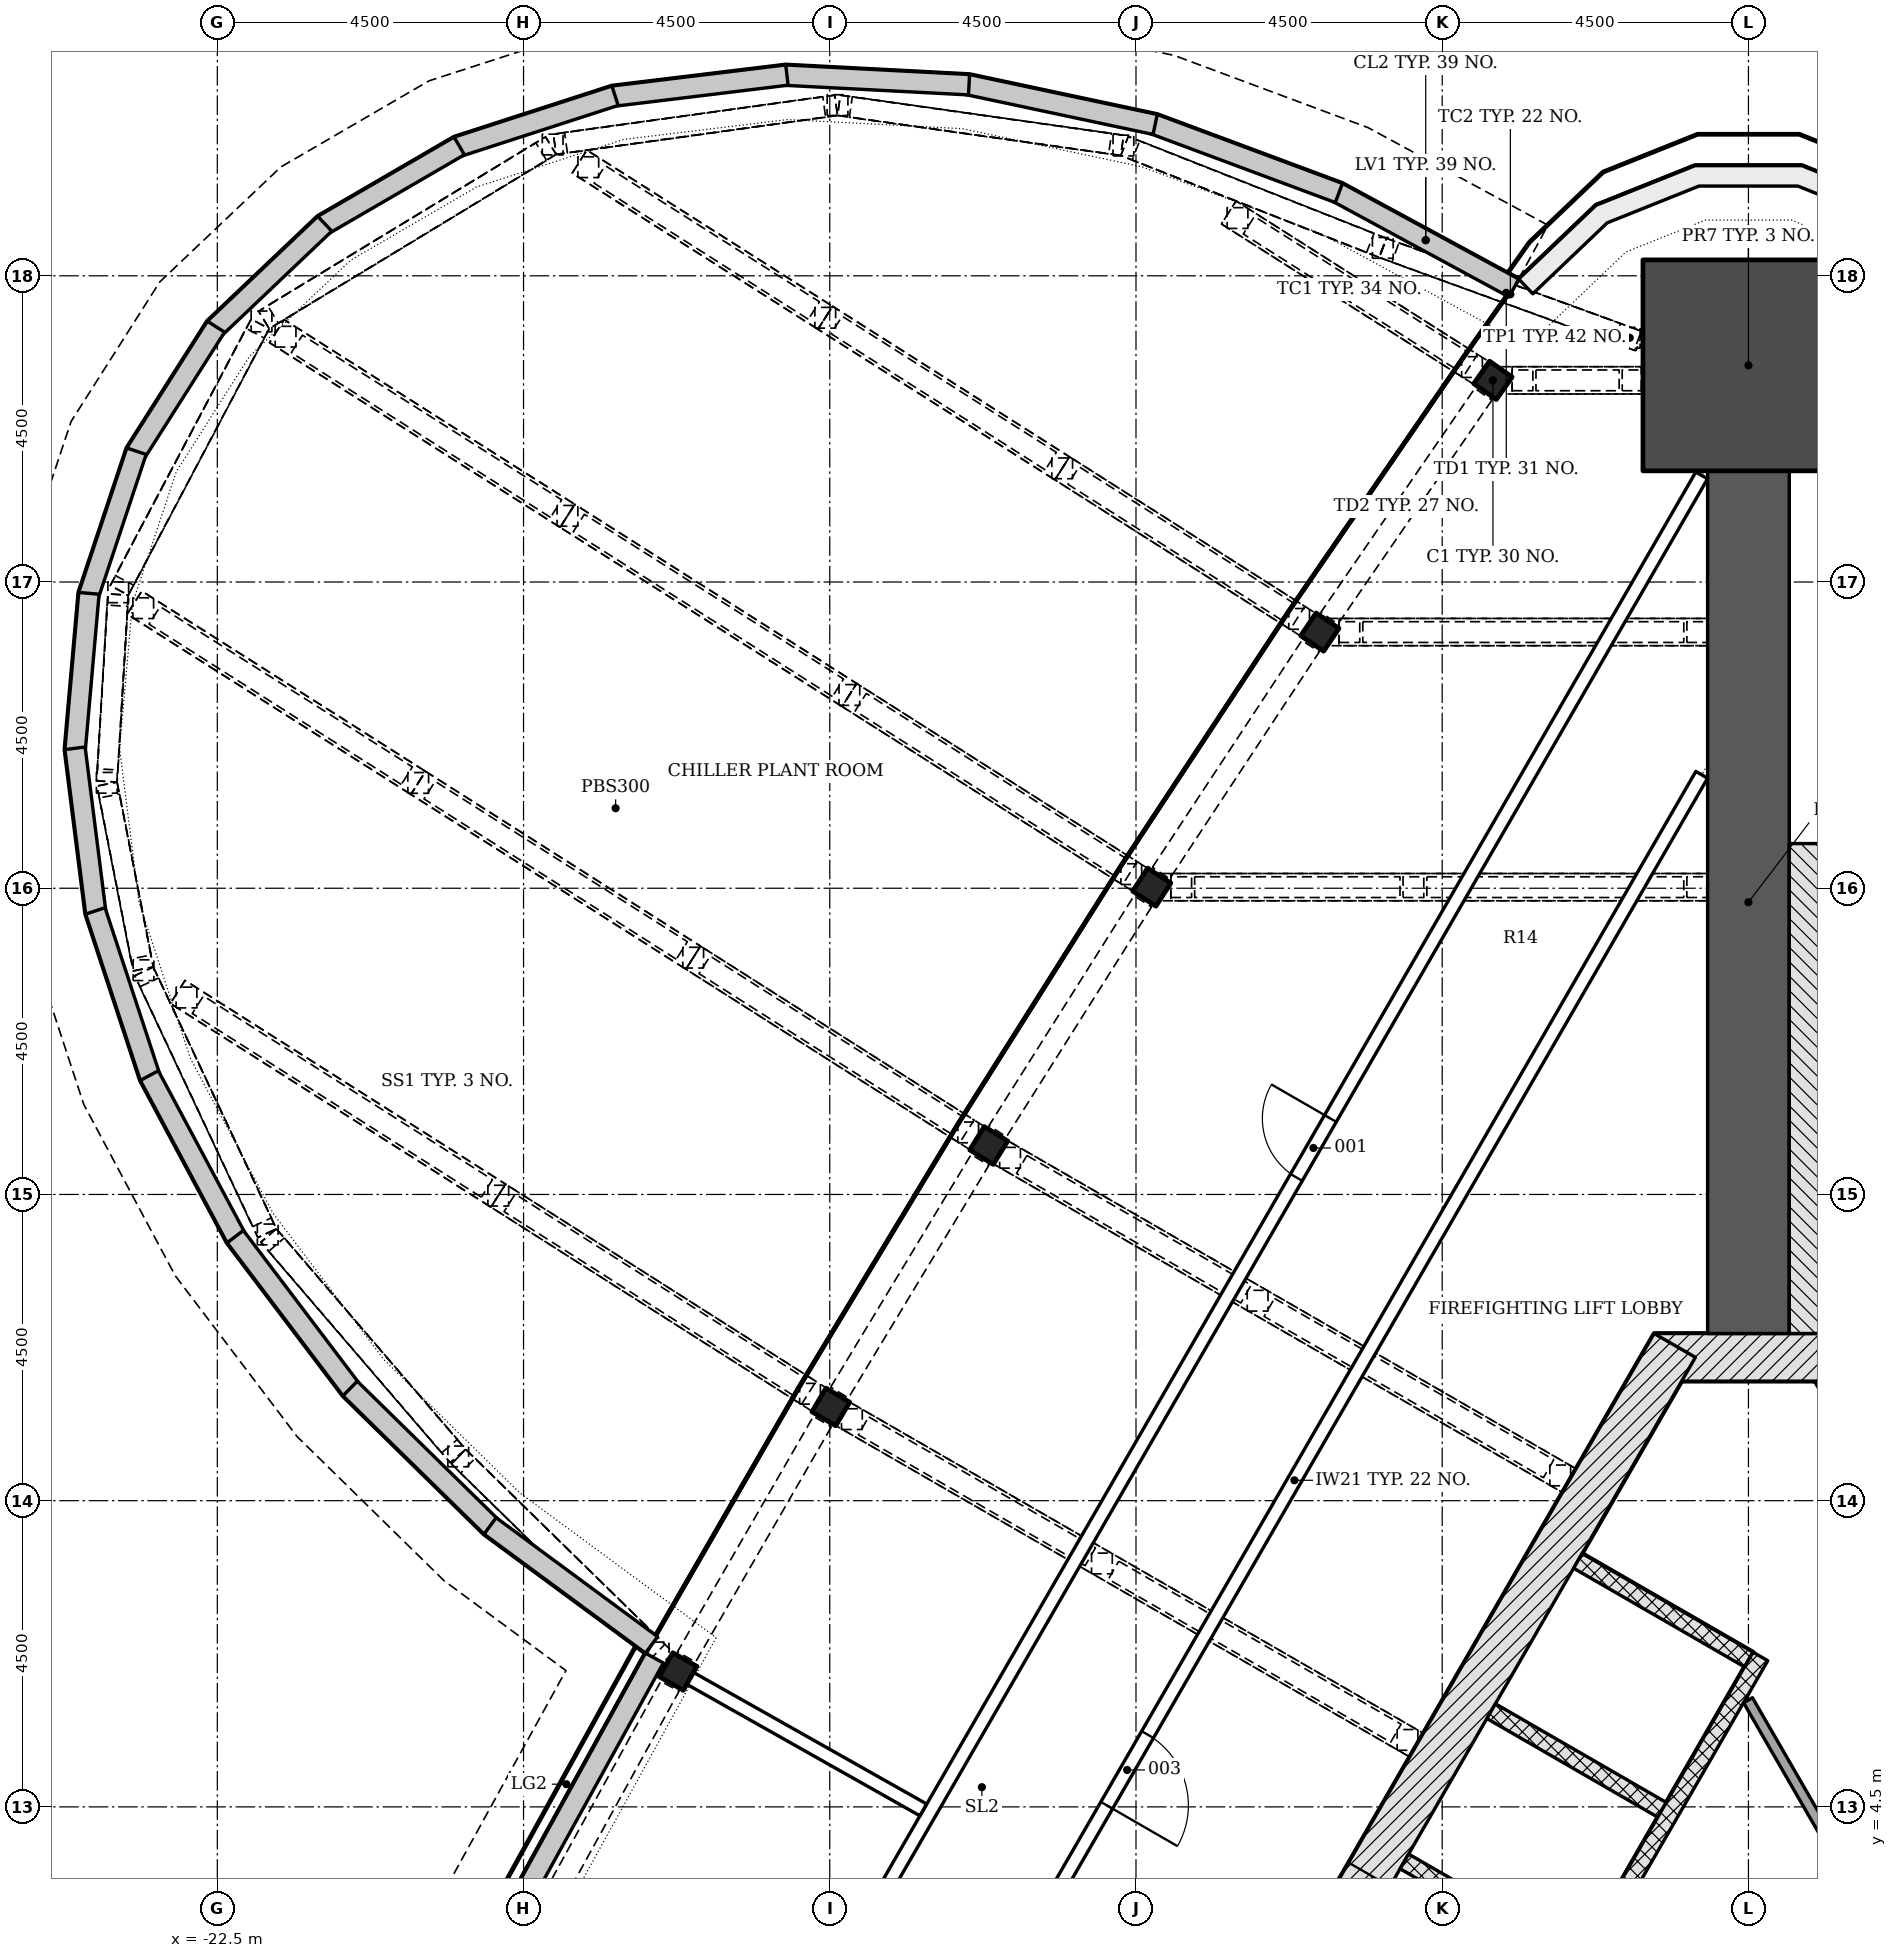
"""IFC4 building model, lengths in metres.
Left out: names, types, materials, properties, quantities, classifications, styles, units other than length and angle.
Written with IfcOpenShell. Run it as: python <this file> out.ifc"""

import sys

from ifc_helpers import new_model, si_unit, direction, frame, frame_2d, origin, origin_2d, place, context, subcontext, project, spatial, polyline, rectangle, i_section, outline, extrude, element, fill, save


model = new_model("IFC4")
c1 = context("Model", 3, precision=1e-05, world=origin(), true_north=direction((0.0, 1.0)))
c2 = subcontext(c1, "Body", "Model", "MODEL_VIEW")
j1 = project(units=[si_unit("LENGTHUNIT", "METRE"), si_unit("PLANEANGLEUNIT", "RADIAN")], contexts=[c1])
p1 = place(None, origin())
s1 = spatial("IfcSite", under=j1, at=p1, CompositionType="ELEMENT")
p2 = place(p1, origin())
s2 = spatial("IfcBuilding", under=s1, at=p2, CompositionType="ELEMENT")
p3 = place(p2, frame((0.0, 0.0, 87.0)))
s3 = spatial("IfcBuildingStorey", under=s2, at=p3, CompositionType="ELEMENT", Elevation=87.0)
p4 = place(p3, frame((10.311, -4.703, -0.3), z_axis=(0.0, 0.0, 1.0), x_axis=(-0.500001446645, 0.866024568562, 0.0)))
e1 = element("IfcWall", 1, at=p4, inside=s3, PredefinedType="SHEAR", context=c2, shape_type="SweptSolid", body=[
    extrude(rectangle(XDim=18.458, YDim=0.7, at=frame_2d((9.229, 0.0))), origin(), (0.0, 0.0, 1.0), 4.6),
])
p5 = place(p4, frame((8.7, 0.0, 0.3)))
e2 = element("IfcOpeningElement", 2, at=p5, cuts=e1, PredefinedType="OPENING", context=c2, shape_type="SweptSolid", body=[
    extrude(rectangle(XDim=1.0, YDim=2.1, at=frame_2d((0.5, 1.05))), frame((0.0, 0.36, 0.0), z_axis=(0.0, -1.0, 0.0), x_axis=(1.0, 0.0, 0.0)), (0.0, 0.0, 1.0), 0.72),
])
p6 = place(p4, frame((4.002, 0.0, 0.3)))
e3 = element("IfcOpeningElement", 3, at=p6, cuts=e1, PredefinedType="OPENING", context=c2, shape_type="SweptSolid", body=[
    extrude(rectangle(XDim=0.9, YDim=2.1, at=frame_2d((0.45, 1.05))), frame((0.0, 0.36, 0.0), z_axis=(0.0, -1.0, 0.0), x_axis=(1.0, 0.0, 0.0)), (0.0, 0.0, 1.0), 0.72),
])
p7 = place(p4, frame((14.093, 0.0, 0.3)))
e4 = element("IfcOpeningElement", 4, at=p7, cuts=e1, PredefinedType="OPENING", context=c2, shape_type="SweptSolid", body=[
    extrude(rectangle(XDim=0.9, YDim=2.1, at=frame_2d((0.45, 1.05))), frame((0.0, 0.36, 0.0), z_axis=(0.0, -1.0, 0.0), x_axis=(1.0, 0.0, 0.0)), (0.0, 0.0, 1.0), 0.72),
])
p8 = place(p3, frame((1.386, 11.106, -0.3), z_axis=(0.0, 0.0, 1.0), x_axis=(-1.0, 0.0, 0.0)))
e5 = element("IfcWall", 5, at=p8, inside=s3, PredefinedType="SHEAR", context=c2, shape_type="SweptSolid", body=[
    extrude(rectangle(XDim=2.771, YDim=0.7, at=frame_2d((1.386, 0.0))), origin(), (0.0, 0.0, 1.0), 4.6),
])
p9 = place(p3, frame((-1.083, 11.281, -0.3), z_axis=(0.0, 0.0, 1.0), x_axis=(-0.500001446645, -0.866024568562, 0.0)))
e6 = element("IfcWall", 6, at=p9, inside=s3, PredefinedType="SHEAR", context=c2, shape_type="SweptSolid", body=[
    extrude(rectangle(XDim=18.458, YDim=0.7, at=frame_2d((9.229, 0.0))), origin(), (0.0, 0.0, 1.0), 4.6),
])
p10 = place(p9, frame((8.979, 0.0, 0.3)))
e7 = element("IfcOpeningElement", 7, at=p10, cuts=e6, PredefinedType="OPENING", context=c2, shape_type="SweptSolid", body=[
    extrude(rectangle(XDim=1.2, YDim=2.1, at=frame_2d((0.6, 1.05))), frame((0.0, 0.36, 0.0), z_axis=(0.0, -1.0, 0.0), x_axis=(1.0, 0.0, 0.0)), (0.0, 0.0, 1.0), 0.72),
])
p11 = place(p9, frame((11.029, 0.0, 0.3)))
e8 = element("IfcOpeningElement", 8, at=p11, cuts=e6, PredefinedType="OPENING", context=c2, shape_type="SweptSolid", body=[
    extrude(rectangle(XDim=1.2, YDim=2.1, at=frame_2d((0.6, 1.05))), frame((0.0, 0.36, 0.0), z_axis=(0.0, -1.0, 0.0), x_axis=(1.0, 0.0, 0.0)), (0.0, 0.0, 1.0), 0.72),
])
p12 = place(p3, frame((0.0, 11.456, -0.3), z_axis=(0.0, 0.0, 1.0), x_axis=(0.0, 1.0, 0.0)))
e9 = element("IfcWall", 9, at=p12, inside=s3, PredefinedType="SHEAR", context=c2, shape_type="SweptSolid", body=[
    extrude(rectangle(XDim=12.678, YDim=1.2, at=frame_2d((6.339, 0.0))), origin(), (0.0, 0.0, 1.0), 4.6),
])
p13 = place(p3, frame((0.0, 25.684, -0.3), z_axis=(0.0, 0.0, 1.0), x_axis=(0.0, 1.0, 0.0)))
e10 = element("IfcColumn", 10, at=p13, inside=s3, PredefinedType="COLUMN", context=c2, shape_type="SweptSolid", body=[
    extrude(rectangle(XDim=3.1, YDim=3.1, at=origin_2d()), origin(), (0.0, 0.0, 1.0), 4.6),
])
for number, where, z_axis, x_axis in (
    (11, (-3.755, 25.464, -0.3), (0.0, 0.0, 1.0), (-0.575, -0.818, 0.0)),
    (12, (-6.298, 21.765, -0.3), (0.0, 0.0, 1.0), (-0.558, -0.83, 0.0)),
    (13, (-8.768, 18.016, -0.3), (0.0, 0.0, 1.0), (-0.542, -0.84, 0.0)),
    (14, (-11.164, 14.22, -0.3), (0.0, 0.0, 1.0), (-0.525, -0.851, 0.0)),
    (15, (-13.484, 10.377, -0.3), (0.0, 0.0, 1.0), (-0.508, -0.861, 0.0)),
    (16, (-15.729, 6.49, -0.3), (0.0, 0.0, 1.0), (-0.491, -0.871, 0.0)),
):
    element("IfcColumn", number, at=place(p3, frame(where, z_axis=z_axis, x_axis=x_axis)), inside=s3, PredefinedType="COLUMN", context=c2, shape_type="SweptSolid", body=[
        extrude(i_section(OverallWidth=0.404, OverallDepth=0.406, WebThickness=0.027, FlangeThickness=0.044, FilletRadius=0.015, at=origin_2d()), origin(), (0.0, 0.0, 1.0), 4.6),
    ])
p14 = place(p3, origin())
e17 = element("IfcWall", 17, at=p14, inside=s3, PredefinedType="NOTDEFINED", context=c2, shape_type="SweptSolid", body=[
    extrude(outline(polyline([(-3.375, 26.953), (-5.966, 28.358), (-6.109, 28.094), (-3.519, 26.689), (-3.375, 26.953)])), origin(), (0.0, 0.0, 1.0), 1.2),
])
p15 = place(p3, origin())
e18 = element("IfcWall", 18, at=p15, inside=s3, PredefinedType="NOTDEFINED", context=c2, shape_type="SweptSolid", body=[
    extrude(outline(polyline([(-5.966, 28.358), (-8.687, 29.371), (-8.792, 29.09), (-6.071, 28.076), (-5.966, 28.358)])), origin(), (0.0, 0.0, 1.0), 1.2),
])
p16 = place(p3, origin())
e19 = element("IfcWall", 19, at=p16, inside=s3, PredefinedType="NOTDEFINED", context=c2, shape_type="SweptSolid", body=[
    extrude(outline(polyline([(-8.687, 29.371), (-11.446, 29.958), (-11.508, 29.665), (-8.75, 29.077), (-8.687, 29.371)])), origin(), (0.0, 0.0, 1.0), 1.2),
])
p17 = place(p3, origin())
e20 = element("IfcWall", 20, at=p17, inside=s3, PredefinedType="NOTDEFINED", context=c2, shape_type="SweptSolid", body=[
    extrude(outline(polyline([(-11.446, 29.958), (-14.148, 30.099), (-14.163, 29.799), (-11.461, 29.658), (-11.446, 29.958)])), origin(), (0.0, 0.0, 1.0), 1.2),
])
p18 = place(p3, origin())
e21 = element("IfcWall", 21, at=p18, inside=s3, PredefinedType="NOTDEFINED", context=c2, shape_type="SweptSolid", body=[
    extrude(outline(polyline([(-14.148, 30.099), (-16.702, 29.789), (-16.666, 29.491), (-14.112, 29.801), (-14.148, 30.099)])), origin(), (0.0, 0.0, 1.0), 1.2),
])
p19 = place(p3, origin())
e22 = element("IfcWall", 22, at=p19, inside=s3, PredefinedType="NOTDEFINED", context=c2, shape_type="SweptSolid", body=[
    extrude(outline(polyline([(-16.702, 29.789), (-19.02, 29.039), (-18.928, 28.753), (-16.609, 29.503), (-16.702, 29.789)])), origin(), (0.0, 0.0, 1.0), 1.2),
])
p20 = place(p3, origin())
e23 = element("IfcWall", 23, at=p20, inside=s3, PredefinedType="NOTDEFINED", context=c2, shape_type="SweptSolid", body=[
    extrude(outline(polyline([(-19.02, 29.039), (-21.024, 27.873), (-20.874, 27.614), (-18.869, 28.779), (-19.02, 29.039)])), origin(), (0.0, 0.0, 1.0), 1.2),
])
p21 = place(p3, origin())
e24 = element("IfcWall", 24, at=p21, inside=s3, PredefinedType="NOTDEFINED", context=c2, shape_type="SweptSolid", body=[
    extrude(outline(polyline([(-21.024, 27.873), (-22.646, 26.333), (-22.439, 26.115), (-20.818, 27.656), (-21.024, 27.873)])), origin(), (0.0, 0.0, 1.0), 1.2),
])
p22 = place(p3, origin())
e25 = element("IfcWall", 25, at=p22, inside=s3, PredefinedType="NOTDEFINED", context=c2, shape_type="SweptSolid", body=[
    extrude(outline(polyline([(-22.646, 26.333), (-23.83, 24.469), (-23.577, 24.309), (-22.393, 26.172), (-22.646, 26.333)])), origin(), (0.0, 0.0, 1.0), 1.2),
])
p23 = place(p3, origin())
e26 = element("IfcWall", 26, at=p23, inside=s3, PredefinedType="NOTDEFINED", context=c2, shape_type="SweptSolid", body=[
    extrude(outline(polyline([(-23.83, 24.469), (-24.536, 22.347), (-24.251, 22.252), (-23.545, 24.375), (-23.83, 24.469)])), origin(), (0.0, 0.0, 1.0), 1.2),
])
p24 = place(p3, origin())
e27 = element("IfcWall", 27, at=p24, inside=s3, PredefinedType="NOTDEFINED", context=c2, shape_type="SweptSolid", body=[
    extrude(outline(polyline([(-24.536, 22.347), (-24.74, 20.038), (-24.441, 20.011), (-24.237, 22.321), (-24.536, 22.347)])), origin(), (0.0, 0.0, 1.0), 1.2),
])
p25 = place(p3, origin())
e28 = element("IfcWall", 28, at=p25, inside=s3, PredefinedType="NOTDEFINED", context=c2, shape_type="SweptSolid", body=[
    extrude(outline(polyline([(-24.74, 20.038), (-24.435, 17.62), (-24.137, 17.657), (-24.442, 20.075), (-24.74, 20.038)])), origin(), (0.0, 0.0, 1.0), 1.2),
])
p26 = place(p3, origin())
e29 = element("IfcWall", 29, at=p26, inside=s3, PredefinedType="NOTDEFINED", context=c2, shape_type="SweptSolid", body=[
    extrude(outline(polyline([(-24.435, 17.62), (-23.631, 15.176), (-23.346, 15.27), (-24.15, 17.714), (-24.435, 17.62)])), origin(), (0.0, 0.0, 1.0), 1.2),
])
p27 = place(p3, origin())
e30 = element("IfcWall", 30, at=p27, inside=s3, PredefinedType="NOTDEFINED", context=c2, shape_type="SweptSolid", body=[
    extrude(outline(polyline([(-23.631, 15.176), (-22.356, 12.79), (-22.091, 12.931), (-23.366, 15.318), (-23.631, 15.176)])), origin(), (0.0, 0.0, 1.0), 1.2),
])
p28 = place(p3, origin())
e31 = element("IfcWall", 31, at=p28, inside=s3, PredefinedType="NOTDEFINED", context=c2, shape_type="SweptSolid", body=[
    extrude(outline(polyline([(-22.356, 12.79), (-20.653, 10.542), (-20.414, 10.723), (-22.117, 12.971), (-22.356, 12.79)])), origin(), (0.0, 0.0, 1.0), 1.2),
])
p29 = place(p3, origin())
e32 = element("IfcWall", 32, at=p29, inside=s3, PredefinedType="NOTDEFINED", context=c2, shape_type="SweptSolid", body=[
    extrude(outline(polyline([(-20.653, 10.542), (-18.58, 8.509), (-18.37, 8.723), (-20.443, 10.756), (-20.653, 10.542)])), origin(), (0.0, 0.0, 1.0), 1.2),
])
p30 = place(p3, origin())
e33 = element("IfcWall", 33, at=p30, inside=s3, PredefinedType="NOTDEFINED", context=c2, shape_type="SweptSolid", body=[
    extrude(outline(polyline([(-18.58, 8.509), (-16.208, 6.76), (-16.03, 7.001), (-18.402, 8.75), (-18.58, 8.509)])), origin(), (0.0, 0.0, 1.0), 1.2),
])
p31 = place(p3, origin())
e34 = element("IfcWall", 34, at=p31, inside=s3, PredefinedType="NOTDEFINED", context=c2, shape_type="SweptSolid", body=[
    extrude(outline(polyline([(-16.208, 6.76), (-18.381, 2.819), (-18.118, 2.674), (-15.945, 6.615), (-16.208, 6.76)])), origin(), (0.0, 0.0, 1.0), 1.2),
])
p32 = place(p3, origin())
e35 = element("IfcWall", 35, at=p32, inside=s3, PredefinedType="NOTDEFINED", context=c2, shape_type="SweptSolid", body=[
    extrude(outline(polyline([(4.205, 25.78), (3.375, 26.953), (2.24, 28.035), (0.784, 28.619), (-0.784, 28.619), (-2.24, 28.035), (-3.375, 26.953), (-3.168, 26.736), (-2.075, 27.779), (-0.727, 28.319), (0.727, 28.319), (2.075, 27.779), (3.147, 26.756), (3.96, 25.606), (4.205, 25.78)])), origin(), (0.0, 0.0, 1.0), 4.3),
])
p33 = place(p3, frame((-2.506, 8.115, -0.3), z_axis=(0.0, 0.0, 1.0), x_axis=(0.865996321171, -0.50005036918, 0.0)))
e36 = element("IfcWall", 36, at=p33, inside=s3, PredefinedType="PARTITIONING", context=c2, shape_type="SweptSolid", body=[
    extrude(rectangle(XDim=2.9, YDim=0.25, at=frame_2d((1.45, 0.0))), origin(), (0.0, 0.0, 1.0), 4.6),
])
for number, where, z_axis, x_axis in (
    (37, (-3.781, 5.907, -0.3), (0.0, 0.0, 1.0), (0.866, -0.5, 0.0)),
    (38, (-5.056, 3.699, -0.3), (0.0, 0.0, 1.0), (0.866, -0.5, 0.0)),
):
    element("IfcWall", number, at=place(p3, frame(where, z_axis=z_axis, x_axis=x_axis)), inside=s3, PredefinedType="PARTITIONING", context=c2, shape_type="SweptSolid", body=[
        extrude(rectangle(XDim=2.9, YDim=0.25, at=frame_2d((1.45, 0.0))), origin(), (0.0, 0.0, 1.0), 4.6),
    ])
p34 = place(p3, frame((0.176, 6.711, 0.0), z_axis=(0.0, 0.0, 1.0), x_axis=(-0.500004227369, -0.866022963098, 0.0)))
e39 = element("IfcWall", 39, at=p34, inside=s3, PredefinedType="PARTITIONING", context=c2, shape_type="SweptSolid", body=[
    extrude(rectangle(XDim=11.8, YDim=0.25, at=frame_2d((5.9, 0.0))), origin(), (0.0, 0.0, 1.0), 4.3),
])
p35 = place(p3, frame((-4.548, -1.851, 0.0), z_axis=(0.0, 0.0, 1.0), x_axis=(0.866023939251, 0.500002536638, 0.0)))
e40 = element("IfcWall", 40, at=p35, inside=s3, PredefinedType="PARTITIONING", context=c2, shape_type="SweptSolid", body=[
    extrude(rectangle(XDim=11.092, YDim=0.15, at=frame_2d((5.546, 0.0))), origin(), (0.0, 0.0, 1.0), 4.3),
])
p36 = place(p35, frame((3.497, 0.0, 0.0)))
e41 = element("IfcOpeningElement", 41, at=p36, cuts=e40, PredefinedType="OPENING", context=c2, shape_type="SweptSolid", body=[
    extrude(rectangle(XDim=0.9, YDim=2.1, at=frame_2d((0.45, 1.05))), frame((0.0, 0.085, 0.0), z_axis=(0.0, -1.0, 0.0), x_axis=(1.0, 0.0, 0.0)), (0.0, 0.0, 1.0), 0.17),
])
p37 = place(p3, frame((2.099, 2.42, 0.0), z_axis=(0.0, 0.0, 1.0), x_axis=(-0.499998449073, 0.866026299211, 0.0)))
e42 = element("IfcWall", 42, at=p37, inside=s3, PredefinedType="PARTITIONING", context=c2, shape_type="SweptSolid", body=[
    extrude(rectangle(XDim=4.211, YDim=0.15, at=frame_2d((2.106, 0.0))), origin(), (0.0, 0.0, 1.0), 4.3),
])
p38 = place(p3, frame((1.093, 11.456, -0.3), z_axis=(0.0, 0.0, 1.0), x_axis=(0.0, 1.0, 0.0)))
e43 = element("IfcWall", 43, at=p38, inside=s3, PredefinedType="SHEAR", context=c2, shape_type="SweptSolid", body=[
    extrude(rectangle(XDim=7.2, YDim=0.986, at=frame_2d((3.6, 0.0))), origin(), (0.0, 0.0, 1.0), 4.6),
])
p39 = place(p3, frame((-0.687, 19.667, 0.0), z_axis=(0.0, 0.0, 1.0), x_axis=(-0.500000491645, -0.866025119933, 0.0)))
e44 = element("IfcWall", 44, at=p39, inside=s3, PredefinedType="PARTITIONING", context=c2, shape_type="SweptSolid", body=[
    extrude(rectangle(XDim=23.943, YDim=0.2, at=frame_2d((11.971, 0.0))), origin(), (0.0, 0.0, 1.0), 3.678),
])
p40 = place(p39, frame((16.287, 0.0, 0.0)))
e45 = element("IfcOpeningElement", 45, at=p40, cuts=e44, PredefinedType="OPENING", context=c2, shape_type="SweptSolid", body=[
    extrude(rectangle(XDim=1.2, YDim=2.1, at=frame_2d((0.6, 1.05))), frame((0.0, 0.11, 0.0), z_axis=(0.0, -1.0, 0.0), x_axis=(1.0, 0.0, 0.0)), (0.0, 0.0, 1.0), 0.22),
])
p41 = place(p3, frame((-16.45, -3.237, 0.0), z_axis=(0.0, 0.0, 1.0), x_axis=(0.499997734893, 0.866026711541, 0.0)))
e46 = element("IfcWall", 46, at=p41, inside=s3, PredefinedType="PARTITIONING", context=c2, shape_type="SweptSolid", body=[
    extrude(rectangle(XDim=31.527, YDim=0.2, at=frame_2d((15.764, 0.0))), origin(), (0.0, 0.0, 1.0), 3.678),
])
p42 = place(p41, frame((19.615, 0.0, 0.0)))
e47 = element("IfcOpeningElement", 47, at=p42, cuts=e46, PredefinedType="OPENING", context=c2, shape_type="SweptSolid", body=[
    extrude(rectangle(XDim=1.0, YDim=2.1, at=frame_2d((0.5, 1.05))), frame((0.0, 0.11, 0.0), z_axis=(0.0, -1.0, 0.0), x_axis=(1.0, 0.0, 0.0)), (0.0, 0.0, 1.0), 0.22),
])
p43 = place(p41, frame((1.828, 0.0, 0.0)))
e48 = element("IfcOpeningElement", 48, at=p43, cuts=e46, PredefinedType="OPENING", context=c2, shape_type="SweptSolid", body=[
    extrude(rectangle(XDim=1.0, YDim=2.1, at=frame_2d((0.5, 1.05))), frame((0.0, 0.11, 0.0), z_axis=(0.0, -1.0, 0.0), x_axis=(1.0, 0.0, 0.0)), (0.0, 0.0, 1.0), 0.22),
])
p44 = place(p3, frame((-15.598, 6.416, 0.0), z_axis=(0.0, 0.0, 1.0), x_axis=(0.870920683573, -0.491423608433, 0.0)))
e49 = element("IfcWall", 49, at=p44, inside=s3, PredefinedType="PARTITIONING", context=c2, shape_type="SweptSolid", body=[
    extrude(rectangle(XDim=3.987, YDim=0.2, at=frame_2d((1.994, 0.0))), origin(), (0.0, 0.0, 1.0), 3.678),
])
p45 = place(p10, origin())
e50 = element("IfcDoor", 50, at=p45, inside=s3, OperationType="DOUBLE_DOOR_SLIDING", PredefinedType="DOOR", context=c2, shape_type="SweptSolid", body=[
    extrude(rectangle(XDim=1.2, YDim=2.1, at=frame_2d((0.6, 1.05))), frame((0.0, 0.025, 0.0), z_axis=(0.0, -1.0, 0.0), x_axis=(1.0, 0.0, 0.0)), (0.0, 0.0, 1.0), 0.05),
])
fill(e7, e50)
p46 = place(p42, origin())
e51 = element("IfcDoor", 51, at=p46, inside=s3, OperationType="SINGLE_SWING_RIGHT", PredefinedType="DOOR", context=c2, shape_type="SweptSolid", body=[
    extrude(rectangle(XDim=1.0, YDim=2.1, at=frame_2d((0.5, 1.05))), frame((0.0, 0.025, 0.0), z_axis=(0.0, -1.0, 0.0), x_axis=(1.0, 0.0, 0.0)), (0.0, 0.0, 1.0), 0.05),
])
fill(e47, e51)
p47 = place(p40, origin())
e52 = element("IfcDoor", 52, at=p47, inside=s3, OperationType="SINGLE_SWING_RIGHT", PredefinedType="DOOR", context=c2, shape_type="SweptSolid", body=[
    extrude(rectangle(XDim=1.2, YDim=2.1, at=frame_2d((0.6, 1.05))), frame((0.0, 0.025, 0.0), z_axis=(0.0, -1.0, 0.0), x_axis=(1.0, 0.0, 0.0)), (0.0, 0.0, 1.0), 0.05),
])
fill(e45, e52)
save(model, sys.argv[1])
